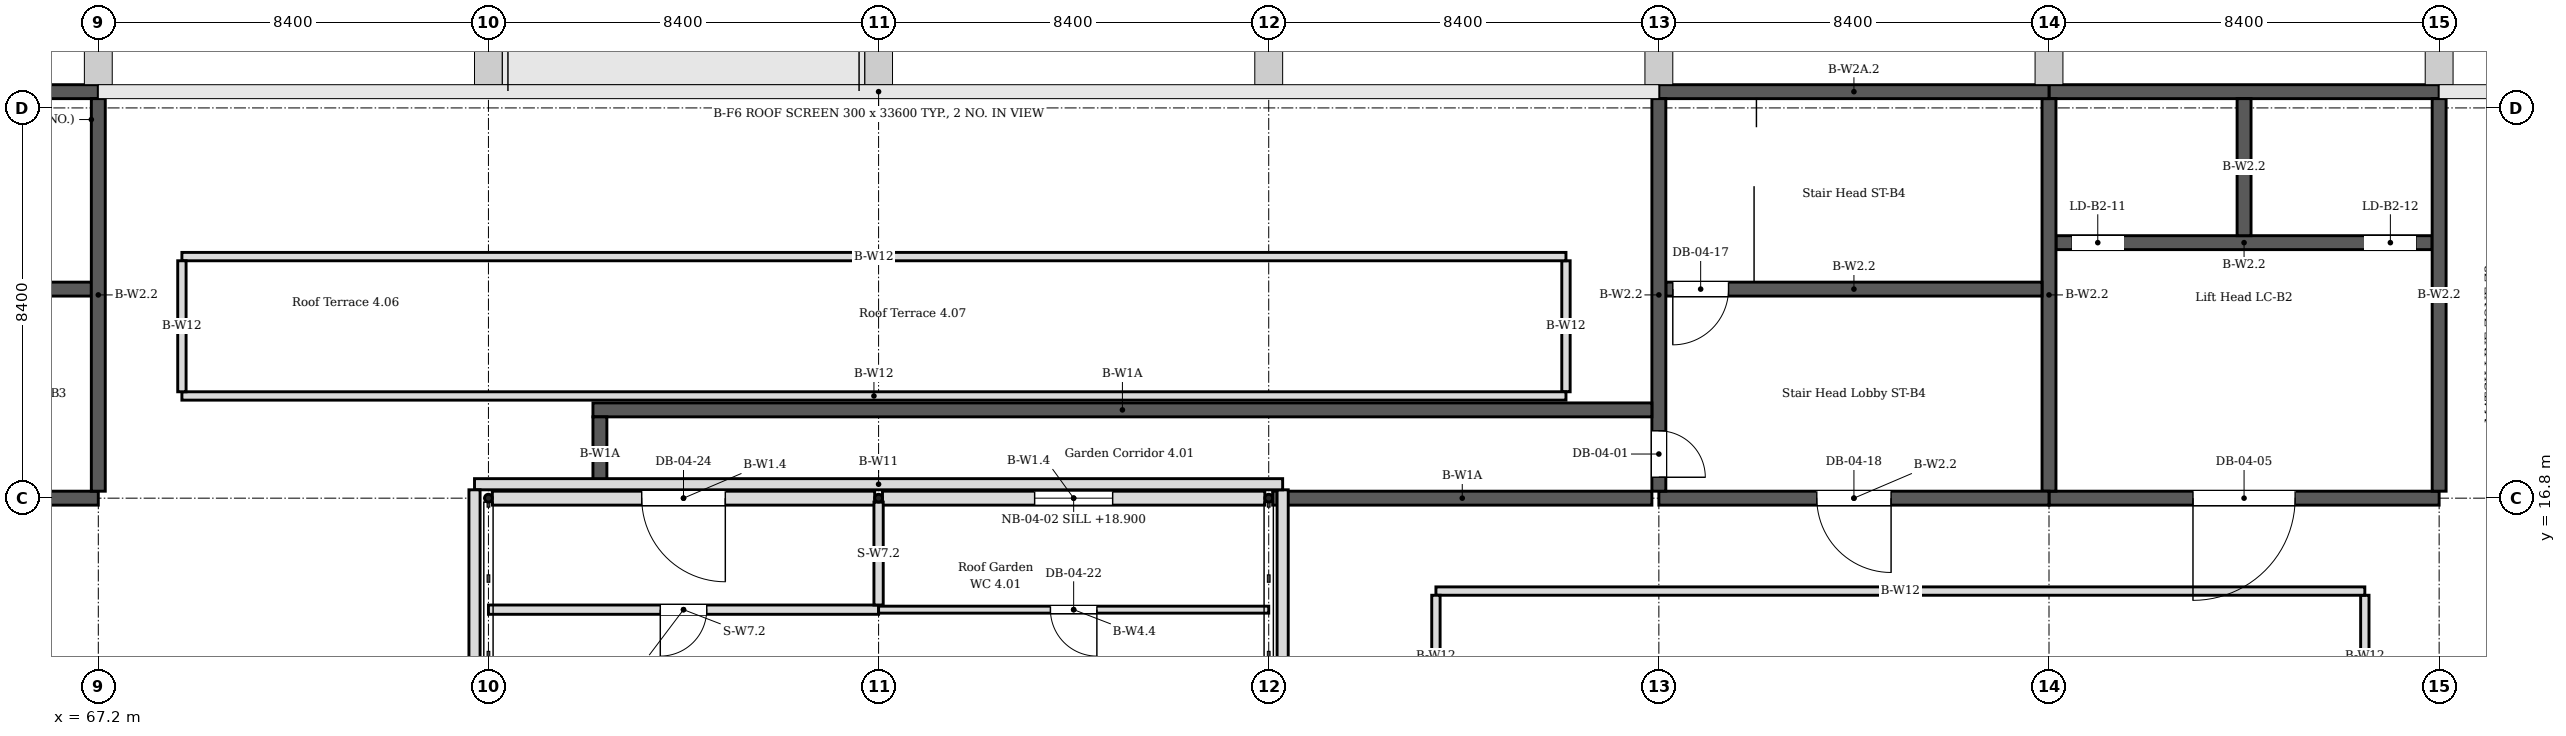
"""IFC4 building model, lengths in metres.
Left out: names, types, materials, properties, quantities, classifications, styles, units other than length and angle.
Written with IfcOpenShell. Run it as: python <this file> out.ifc"""

import sys

from ifc_helpers import new_model, si_unit, direction, frame, frame_2d, origin, origin_2d, place, context, subcontext, project, spatial, rectangle, hollow_circle, extrude, element, fill, save


model = new_model("IFC4")
c1 = context("Model", 3, precision=1e-05, world=origin(), true_north=direction((0.0, 1.0)))
c2 = subcontext(c1, "Body", "Model", "MODEL_VIEW")
j1 = project(units=[si_unit("LENGTHUNIT", "METRE"), si_unit("PLANEANGLEUNIT", "RADIAN")], contexts=[c1])
p1 = place(None, origin())
s1 = spatial("IfcSite", under=j1, at=p1, CompositionType="ELEMENT")
p2 = place(p1, origin())
s2 = spatial("IfcBuilding", under=s1, at=p2, CompositionType="ELEMENT")
p3 = place(p2, frame((0.0, 0.0, 18.6)))
s3 = spatial("IfcBuildingStorey", under=s2, at=p3, CompositionType="ELEMENT", Elevation=18.6)
for number, where, z_axis, x_axis in (
    (1, (109.2, 16.95, 0.0), (0.0, 0.0, 1.0), (0.0, 1.0, 0.0)),
    (2, (117.6, 16.95, 0.0), (0.0, 0.0, 1.0), (0.0, 1.0, 0.0)),
):
    element("IfcWall", number, at=place(p3, frame(where, z_axis=z_axis, x_axis=x_axis)), inside=s3, PredefinedType="SHEAR", context=c2, shape_type="SweptSolid", body=[
        extrude(rectangle(XDim=8.45, YDim=0.3, at=frame_2d((4.225, 0.0))), origin(), (0.0, 0.0, 1.0), 3.89),
    ])
p4 = place(p3, frame((109.2, 16.8, 0.0), z_axis=(0.0, 0.0, 1.0), x_axis=(1.0, 0.0, 0.0)))
e3 = element("IfcWall", 3, at=p4, inside=s3, PredefinedType="SHEAR", context=c2, shape_type="SweptSolid", body=[
    extrude(rectangle(XDim=8.4, YDim=0.3, at=frame_2d((4.2, 0.0))), origin(), (0.0, 0.0, 1.0), 3.89),
])
p5 = place(p4, frame((3.1, 0.0, 0.0)))
e4 = element("IfcOpeningElement", 4, at=p5, cuts=e3, PredefinedType="OPENING", context=c2, shape_type="SweptSolid", body=[
    extrude(rectangle(XDim=2.2, YDim=2.6, at=frame_2d((1.1, 1.3))), frame((0.0, 0.16, 0.0), z_axis=(0.0, -1.0, 0.0), x_axis=(1.0, 0.0, 0.0)), (0.0, 0.0, 1.0), 0.32),
])
p6 = place(p3, frame((109.35, 22.3, 0.0), z_axis=(0.0, 0.0, 1.0), x_axis=(1.0, 0.0, 0.0)))
e5 = element("IfcWall", 5, at=p6, inside=s3, PredefinedType="SHEAR", context=c2, shape_type="SweptSolid", body=[
    extrude(rectangle(XDim=8.1, YDim=0.3, at=frame_2d((4.05, 0.0))), origin(), (0.0, 0.0, 1.0), 3.89),
])
p7 = place(p6, frame((0.35, 0.0, 0.0)))
e6 = element("IfcOpeningElement", 6, at=p7, cuts=e5, PredefinedType="OPENING", context=c2, shape_type="SweptSolid", body=[
    extrude(rectangle(XDim=1.1, YDim=2.2, at=frame_2d((0.55, 1.1))), frame((0.0, 0.16, 0.0), z_axis=(0.0, -1.0, 0.0), x_axis=(1.0, 0.0, 0.0)), (0.0, 0.0, 1.0), 0.32),
])
p8 = place(p6, frame((6.65, 0.0, 0.0)))
e7 = element("IfcOpeningElement", 7, at=p8, cuts=e5, PredefinedType="OPENING", context=c2, shape_type="SweptSolid", body=[
    extrude(rectangle(XDim=1.1, YDim=2.2, at=frame_2d((0.55, 1.1))), frame((0.0, 0.16, 0.0), z_axis=(0.0, -1.0, 0.0), x_axis=(1.0, 0.0, 0.0)), (0.0, 0.0, 1.0), 0.32),
])
p9 = place(p3, frame((109.2, 25.55, 0.0), z_axis=(0.0, 0.0, 1.0), x_axis=(1.0, 0.0, 0.0)))
e8 = element("IfcWall", 8, at=p9, inside=s3, PredefinedType="SHEAR", context=c2, shape_type="SweptSolid", body=[
    extrude(rectangle(XDim=8.4, YDim=0.3, at=frame_2d((4.2, 0.0))), origin(), (0.0, 0.0, 1.0), 3.89),
])
p10 = place(p3, frame((113.4, 22.45, 0.0), z_axis=(0.0, 0.0, 1.0), x_axis=(0.0, 1.0, 0.0)))
e9 = element("IfcWall", 9, at=p10, inside=s3, PredefinedType="SHEAR", context=c2, shape_type="SweptSolid", body=[
    extrude(rectangle(XDim=2.95, YDim=0.3, at=frame_2d((1.475, 0.0))), origin(), (0.0, 0.0, 1.0), 3.89),
])
p11 = place(p3, frame((67.2, 16.95, 0.0), z_axis=(0.0, 0.0, 1.0), x_axis=(0.0, 1.0, 0.0)))
e10 = element("IfcWall", 10, at=p11, inside=s3, PredefinedType="SHEAR", context=c2, shape_type="SweptSolid", body=[
    extrude(rectangle(XDim=8.45, YDim=0.3, at=frame_2d((4.225, 0.0))), origin(), (0.0, 0.0, 1.0), 3.89),
])
p12 = place(p3, frame((58.8, 16.8, 0.0), z_axis=(0.0, 0.0, 1.0), x_axis=(1.0, 0.0, 0.0)))
e11 = element("IfcWall", 11, at=p12, inside=s3, PredefinedType="SHEAR", context=c2, shape_type="SweptSolid", body=[
    extrude(rectangle(XDim=8.4, YDim=0.3, at=frame_2d((4.2, 0.0))), origin(), (0.0, 0.0, 1.0), 3.89),
])
p13 = place(p12, frame((3.4, 0.0, 0.0)))
e12 = element("IfcOpeningElement", 12, at=p13, cuts=e11, PredefinedType="OPENING", context=c2, shape_type="SweptSolid", body=[
    extrude(rectangle(XDim=1.6, YDim=2.4, at=frame_2d((0.8, 1.2))), frame((0.0, 0.16, 0.0), z_axis=(0.0, -1.0, 0.0), x_axis=(1.0, 0.0, 0.0)), (0.0, 0.0, 1.0), 0.32),
])
p14 = place(p3, frame((58.95, 21.3, 0.0), z_axis=(0.0, 0.0, 1.0), x_axis=(1.0, 0.0, 0.0)))
e13 = element("IfcWall", 13, at=p14, inside=s3, PredefinedType="SHEAR", context=c2, shape_type="SweptSolid", body=[
    extrude(rectangle(XDim=8.1, YDim=0.3, at=frame_2d((4.05, 0.0))), origin(), (0.0, 0.0, 1.0), 3.89),
])
p15 = place(p14, frame((0.15, 0.0, 0.0)))
e14 = element("IfcOpeningElement", 14, at=p15, cuts=e13, PredefinedType="OPENING", context=c2, shape_type="SweptSolid", body=[
    extrude(rectangle(XDim=1.2, YDim=2.1, at=frame_2d((0.6, 1.05))), frame((0.0, 0.16, 0.0), z_axis=(0.0, -1.0, 0.0), x_axis=(1.0, 0.0, 0.0)), (0.0, 0.0, 1.0), 0.32),
])
p16 = place(p3, frame((58.8, 25.55, 0.0), z_axis=(0.0, 0.0, 1.0), x_axis=(1.0, 0.0, 0.0)))
e15 = element("IfcWall", 15, at=p16, inside=s3, PredefinedType="SHEAR", context=c2, shape_type="SweptSolid", body=[
    extrude(rectangle(XDim=8.4, YDim=0.3, at=frame_2d((4.2, 0.0))), origin(), (0.0, 0.0, 1.0), 3.89),
])
p17 = place(p3, frame((100.8, 16.95, 0.0), z_axis=(0.0, 0.0, 1.0), x_axis=(0.0, 1.0, 0.0)))
e16 = element("IfcWall", 16, at=p17, inside=s3, PredefinedType="SHEAR", context=c2, shape_type="SweptSolid", body=[
    extrude(rectangle(XDim=8.45, YDim=0.3, at=frame_2d((4.225, 0.0))), origin(), (0.0, 0.0, 1.0), 3.89),
])
p18 = place(p17, frame((0.3, 0.0, 0.0)))
e17 = element("IfcOpeningElement", 17, at=p18, cuts=e16, PredefinedType="OPENING", context=c2, shape_type="SweptSolid", body=[
    extrude(rectangle(XDim=1.0, YDim=2.1, at=frame_2d((0.5, 1.05))), frame((0.0, 0.16, 0.0), z_axis=(0.0, -1.0, 0.0), x_axis=(1.0, 0.0, 0.0)), (0.0, 0.0, 1.0), 0.32),
])
p19 = place(p3, frame((100.8, 16.8, 0.0), z_axis=(0.0, 0.0, 1.0), x_axis=(1.0, 0.0, 0.0)))
e18 = element("IfcWall", 18, at=p19, inside=s3, PredefinedType="SHEAR", context=c2, shape_type="SweptSolid", body=[
    extrude(rectangle(XDim=8.4, YDim=0.3, at=frame_2d((4.2, 0.0))), origin(), (0.0, 0.0, 1.0), 3.89),
])
p20 = place(p19, frame((3.4, 0.0, 0.0)))
e19 = element("IfcOpeningElement", 19, at=p20, cuts=e18, PredefinedType="OPENING", context=c2, shape_type="SweptSolid", body=[
    extrude(rectangle(XDim=1.6, YDim=2.4, at=frame_2d((0.8, 1.2))), frame((0.0, 0.16, 0.0), z_axis=(0.0, -1.0, 0.0), x_axis=(1.0, 0.0, 0.0)), (0.0, 0.0, 1.0), 0.32),
])
p21 = place(p3, frame((100.95, 21.3, 0.0), z_axis=(0.0, 0.0, 1.0), x_axis=(1.0, 0.0, 0.0)))
e20 = element("IfcWall", 20, at=p21, inside=s3, PredefinedType="SHEAR", context=c2, shape_type="SweptSolid", body=[
    extrude(rectangle(XDim=8.1, YDim=0.3, at=frame_2d((4.05, 0.0))), origin(), (0.0, 0.0, 1.0), 3.89),
])
p22 = place(p21, frame((0.15, 0.0, 0.0)))
e21 = element("IfcOpeningElement", 21, at=p22, cuts=e20, PredefinedType="OPENING", context=c2, shape_type="SweptSolid", body=[
    extrude(rectangle(XDim=1.2, YDim=2.1, at=frame_2d((0.6, 1.05))), frame((0.0, 0.16, 0.0), z_axis=(0.0, -1.0, 0.0), x_axis=(1.0, 0.0, 0.0)), (0.0, 0.0, 1.0), 0.32),
])
p23 = place(p3, frame((100.8, 25.55, 0.0), z_axis=(0.0, 0.0, 1.0), x_axis=(1.0, 0.0, 0.0)))
e22 = element("IfcWall", 22, at=p23, inside=s3, PredefinedType="SHEAR", context=c2, shape_type="SweptSolid", body=[
    extrude(rectangle(XDim=8.4, YDim=0.3, at=frame_2d((4.2, 0.0))), origin(), (0.0, 0.0, 1.0), 3.89),
])
for number, where, z_axis, x_axis in (
    (23, (75.6, 16.8, 0.0), (0.0, 0.0, 1.0), (1.0, 0.0, 0.0)),
    (24, (84.0, 16.8, 0.0), (0.0, 0.0, 1.0), (1.0, 0.0, 0.0)),
    (25, (92.4, 16.8, 0.0), (0.0, 0.0, 1.0), (1.0, 0.0, 0.0)),
):
    element("IfcColumn", number, at=place(p3, frame(where, z_axis=z_axis, x_axis=x_axis)), inside=s3, PredefinedType="COLUMN", context=c2, shape_type="SweptSolid", body=[
        extrude(hollow_circle(Radius=0.084, WallThickness=0.008, at=origin_2d()), origin(), (0.0, 0.0, 1.0), 3.6),
    ])
p24 = place(p3, frame((92.484, 16.8, 0.0), z_axis=(0.0, 0.0, 1.0), x_axis=(1.0, 0.0, 0.0)))
e26 = element("IfcWall", 26, at=p24, inside=s3, PredefinedType="SOLIDWALL", context=c2, shape_type="SweptSolid", body=[
    extrude(rectangle(XDim=8.166, YDim=0.3, at=frame_2d((4.083, 0.0))), origin(), (0.0, 0.0, 1.0), 3.0),
])
p25 = place(p3, frame((77.85, 18.7, 0.0), z_axis=(0.0, 0.0, 1.0), x_axis=(1.0, 0.0, 0.0)))
e27 = element("IfcWall", 27, at=p25, inside=s3, PredefinedType="SOLIDWALL", context=c2, shape_type="SweptSolid", body=[
    extrude(rectangle(XDim=22.8, YDim=0.3, at=frame_2d((11.4, 0.0))), origin(), (0.0, 0.0, 1.0), 3.0),
])
p26 = place(p3, frame((78.0, 16.95, 0.0), z_axis=(0.0, 0.0, 1.0), x_axis=(0.0, 1.0, 0.0)))
e28 = element("IfcWall", 28, at=p26, inside=s3, PredefinedType="SOLIDWALL", context=c2, shape_type="SweptSolid", body=[
    extrude(rectangle(XDim=1.6, YDim=0.3, at=frame_2d((0.8, 0.0))), origin(), (0.0, 0.0, 1.0), 3.0),
])
p27 = place(p3, frame((75.6, 14.4, 0.0), z_axis=(0.0, 0.0, 1.0), x_axis=(1.0, 0.0, 0.0)))
e29 = element("IfcWall", 29, at=p27, inside=s3, PredefinedType="PARTITIONING", context=c2, shape_type="SweptSolid", body=[
    extrude(rectangle(XDim=8.4, YDim=0.2, at=frame_2d((4.2, 0.0))), origin(), (0.0, 0.0, 1.0), 3.254),
])
p28 = place(p27, frame((3.7, 0.0, 0.0)))
e30 = element("IfcOpeningElement", 30, at=p28, cuts=e29, PredefinedType="OPENING", context=c2, shape_type="SweptSolid", body=[
    extrude(rectangle(XDim=1.0, YDim=2.1, at=frame_2d((0.5, 1.05))), frame((0.0, 0.11, 0.0), z_axis=(0.0, -1.0, 0.0), x_axis=(1.0, 0.0, 0.0)), (0.0, 0.0, 1.0), 0.22),
])
p29 = place(p3, frame((84.0, 14.4, 0.0), z_axis=(0.0, 0.0, 1.0), x_axis=(1.0, 0.0, 0.0)))
e31 = element("IfcWall", 31, at=p29, inside=s3, PredefinedType="PARTITIONING", context=c2, shape_type="SweptSolid", body=[
    extrude(rectangle(XDim=8.4, YDim=0.15, at=frame_2d((4.2, 0.0))), origin(), (0.0, 0.0, 1.0), 3.254),
])
p30 = place(p29, frame((3.7, 0.0, 0.0)))
e32 = element("IfcOpeningElement", 32, at=p30, cuts=e31, PredefinedType="OPENING", context=c2, shape_type="SweptSolid", body=[
    extrude(rectangle(XDim=1.0, YDim=2.1, at=frame_2d((0.5, 1.05))), frame((0.0, 0.085, 0.0), z_axis=(0.0, -1.0, 0.0), x_axis=(1.0, 0.0, 0.0)), (0.0, 0.0, 1.0), 0.17),
])
p31 = place(p3, frame((84.0, 14.5, 0.0), z_axis=(0.0, 0.0, 1.0), x_axis=(0.0, 1.0, 0.0)))
e33 = element("IfcWall", 33, at=p31, inside=s3, PredefinedType="PARTITIONING", context=c2, shape_type="SweptSolid", body=[
    extrude(rectangle(XDim=2.216, YDim=0.2, at=frame_2d((1.108, 0.0))), origin(), (0.0, 0.0, 1.0), 3.254),
])
p32 = place(p3, frame((75.684, 16.8, 0.0), z_axis=(0.0, 0.0, 1.0), x_axis=(1.0, 0.0, 0.0)))
e34 = element("IfcWall", 34, at=p32, inside=s3, PredefinedType="SOLIDWALL", context=c2, shape_type="SweptSolid", body=[
    extrude(rectangle(XDim=8.232, YDim=0.3, at=frame_2d((4.116, 0.0))), origin(), (0.0, 0.0, 1.0), 3.254),
])
p33 = place(p32, frame((3.216, 0.0, 0.0)))
e35 = element("IfcOpeningElement", 35, at=p33, cuts=e34, PredefinedType="OPENING", context=c2, shape_type="SweptSolid", body=[
    extrude(rectangle(XDim=1.8, YDim=2.2, at=frame_2d((0.9, 1.1))), frame((0.0, 0.16, 0.0), z_axis=(0.0, -1.0, 0.0), x_axis=(1.0, 0.0, 0.0)), (0.0, 0.0, 1.0), 0.32),
])
p34 = place(p3, frame((84.084, 16.8, 0.0), z_axis=(0.0, 0.0, 1.0), x_axis=(1.0, 0.0, 0.0)))
e36 = element("IfcWall", 36, at=p34, inside=s3, PredefinedType="SOLIDWALL", context=c2, shape_type="SweptSolid", body=[
    extrude(rectangle(XDim=8.232, YDim=0.3, at=frame_2d((4.116, 0.0))), origin(), (0.0, 0.0, 1.0), 3.254),
])
p35 = place(p34, frame((3.276, 0.0, 0.3)))
e37 = element("IfcOpeningElement", 37, at=p35, cuts=e36, PredefinedType="OPENING", context=c2, shape_type="SweptSolid", body=[
    extrude(rectangle(XDim=1.68, YDim=2.8, at=frame_2d((0.84, 1.4))), frame((0.0, 0.16, 0.0), z_axis=(0.0, -1.0, 0.0), x_axis=(1.0, 0.0, 0.0)), (0.0, 0.0, 1.0), 0.32),
])
p36 = place(p3, frame((75.3, 17.1, 3.8), z_axis=(0.0, 0.0, 1.0), x_axis=(1.0, 0.0, 0.0)))
e38 = element("IfcWall", 38, at=p36, inside=s3, PredefinedType="SOLIDWALL", context=c2, shape_type="SweptSolid", body=[
    extrude(rectangle(XDim=17.4, YDim=0.24, at=frame_2d((8.7, 0.0))), origin(), (0.0, 0.0, 1.0), 0.5),
])
for number, where, z_axis, x_axis in (
    (39, (75.3, 8.22, 3.8), (0.0, 0.0, 1.0), (0.0, 1.0, 0.0)),
    (40, (92.7, 8.22, 3.8), (0.0, 0.0, 1.0), (0.0, 1.0, 0.0)),
):
    element("IfcWall", number, at=place(p3, frame(where, z_axis=z_axis, x_axis=x_axis)), inside=s3, PredefinedType="SOLIDWALL", context=c2, shape_type="SweptSolid", body=[
        extrude(rectangle(XDim=8.76, YDim=0.24, at=frame_2d((4.38, 0.0))), origin(), (0.0, 0.0, 1.0), 0.5),
    ])
p37 = place(p3, frame((96.0, 14.8, 0.0), z_axis=(0.0, 0.0, 1.0), x_axis=(1.0, 0.0, 0.0)))
e41 = element("IfcWall", 41, at=p37, inside=s3, PredefinedType="SOLIDWALL", context=c2, shape_type="SweptSolid", body=[
    extrude(rectangle(XDim=20.0, YDim=0.18, at=frame_2d((10.0, 0.0))), origin(), (0.0, 0.0, 1.0), 0.7),
])
for number, where, z_axis, x_axis in (
    (42, (96.0, 12.09, 0.0), (0.0, 0.0, 1.0), (0.0, 1.0, 0.0)),
    (43, (116.0, 12.09, 0.0), (0.0, 0.0, 1.0), (0.0, 1.0, 0.0)),
):
    element("IfcWall", number, at=place(p3, frame(where, z_axis=z_axis, x_axis=x_axis)), inside=s3, PredefinedType="SOLIDWALL", context=c2, shape_type="SweptSolid", body=[
        extrude(rectangle(XDim=2.62, YDim=0.18, at=frame_2d((1.31, 0.0))), origin(), (0.0, 0.0, 1.0), 0.7),
    ])
for number, where, z_axis, x_axis in (
    (44, (69.0, 19.0, 0.0), (0.0, 0.0, 1.0), (1.0, 0.0, 0.0)),
    (45, (69.0, 22.0, 0.0), (0.0, 0.0, 1.0), (1.0, 0.0, 0.0)),
):
    element("IfcWall", number, at=place(p3, frame(where, z_axis=z_axis, x_axis=x_axis)), inside=s3, PredefinedType="SOLIDWALL", context=c2, shape_type="SweptSolid", body=[
        extrude(rectangle(XDim=29.8, YDim=0.18, at=frame_2d((14.9, 0.0))), origin(), (0.0, 0.0, 1.0), 0.7),
    ])
for number, where, z_axis, x_axis in (
    (46, (69.0, 19.09, 0.0), (0.0, 0.0, 1.0), (0.0, 1.0, 0.0)),
    (47, (98.8, 19.09, 0.0), (0.0, 0.0, 1.0), (0.0, 1.0, 0.0)),
):
    element("IfcWall", number, at=place(p3, frame(where, z_axis=z_axis, x_axis=x_axis)), inside=s3, PredefinedType="SOLIDWALL", context=c2, shape_type="SweptSolid", body=[
        extrude(rectangle(XDim=2.82, YDim=0.18, at=frame_2d((1.41, 0.0))), origin(), (0.0, 0.0, 1.0), 0.7),
    ])
p38 = place(p18, origin())
e48 = element("IfcDoor", 48, at=p38, inside=s3, OperationType="SINGLE_SWING_LEFT", PredefinedType="DOOR", context=c2, shape_type="SweptSolid", body=[
    extrude(rectangle(XDim=1.0, YDim=2.1, at=frame_2d((0.5, 1.05))), frame((0.0, 0.025, 0.0), z_axis=(0.0, -1.0, 0.0), x_axis=(1.0, 0.0, 0.0)), (0.0, 0.0, 1.0), 0.05),
])
fill(e17, e48)
p39 = place(p5, origin())
e49 = element("IfcDoor", 49, at=p39, inside=s3, OperationType="DOUBLE_DOOR_SINGLE_SWING", PredefinedType="DOOR", context=c2, shape_type="SweptSolid", body=[
    extrude(rectangle(XDim=2.2, YDim=2.6, at=frame_2d((1.1, 1.3))), frame((0.0, 0.025, 0.0), z_axis=(0.0, -1.0, 0.0), x_axis=(1.0, 0.0, 0.0)), (0.0, 0.0, 1.0), 0.05),
])
fill(e4, e49)
p40 = place(p7, origin())
e50 = element("IfcDoor", 50, at=p40, inside=s3, OperationType="SLIDING_TO_LEFT", PredefinedType="DOOR", context=c2, shape_type="SweptSolid", body=[
    extrude(rectangle(XDim=1.1, YDim=2.2, at=frame_2d((0.55, 1.1))), frame((0.0, 0.025, 0.0), z_axis=(0.0, -1.0, 0.0), x_axis=(1.0, 0.0, 0.0)), (0.0, 0.0, 1.0), 0.05),
])
fill(e6, e50)
p41 = place(p8, origin())
e51 = element("IfcDoor", 51, at=p41, inside=s3, OperationType="SLIDING_TO_LEFT", PredefinedType="DOOR", context=c2, shape_type="SweptSolid", body=[
    extrude(rectangle(XDim=1.1, YDim=2.2, at=frame_2d((0.55, 1.1))), frame((0.0, 0.025, 0.0), z_axis=(0.0, -1.0, 0.0), x_axis=(1.0, 0.0, 0.0)), (0.0, 0.0, 1.0), 0.05),
])
fill(e7, e51)
p42 = place(p22, origin())
e52 = element("IfcDoor", 52, at=p42, inside=s3, OperationType="SINGLE_SWING_LEFT", PredefinedType="DOOR", context=c2, shape_type="SweptSolid", body=[
    extrude(rectangle(XDim=1.2, YDim=2.1, at=frame_2d((0.6, 1.05))), frame((0.0, 0.025, 0.0), z_axis=(0.0, -1.0, 0.0), x_axis=(1.0, 0.0, 0.0)), (0.0, 0.0, 1.0), 0.05),
])
fill(e21, e52)
p43 = place(p20, origin())
e53 = element("IfcDoor", 53, at=p43, inside=s3, OperationType="DOUBLE_DOOR_SINGLE_SWING", PredefinedType="DOOR", context=c2, shape_type="SweptSolid", body=[
    extrude(rectangle(XDim=1.6, YDim=2.4, at=frame_2d((0.8, 1.2))), frame((0.0, 0.025, 0.0), z_axis=(0.0, -1.0, 0.0), x_axis=(1.0, 0.0, 0.0)), (0.0, 0.0, 1.0), 0.05),
])
fill(e19, e53)
p44 = place(p28, origin())
e54 = element("IfcDoor", 54, at=p44, inside=s3, OperationType="SINGLE_SWING_LEFT", PredefinedType="DOOR", context=c2, shape_type="SweptSolid", body=[
    extrude(rectangle(XDim=1.0, YDim=2.1, at=frame_2d((0.5, 1.05))), frame((0.0, 0.025, 0.0), z_axis=(0.0, -1.0, 0.0), x_axis=(1.0, 0.0, 0.0)), (0.0, 0.0, 1.0), 0.05),
])
fill(e30, e54)
p45 = place(p30, origin())
e55 = element("IfcDoor", 55, at=p45, inside=s3, OperationType="SINGLE_SWING_LEFT", PredefinedType="DOOR", context=c2, shape_type="SweptSolid", body=[
    extrude(rectangle(XDim=1.0, YDim=2.1, at=frame_2d((0.5, 1.05))), frame((0.0, 0.025, 0.0), z_axis=(0.0, -1.0, 0.0), x_axis=(1.0, 0.0, 0.0)), (0.0, 0.0, 1.0), 0.05),
])
fill(e32, e55)
p46 = place(p33, origin())
e56 = element("IfcDoor", 56, at=p46, inside=s3, OperationType="DOUBLE_DOOR_SINGLE_SWING", PredefinedType="DOOR", context=c2, shape_type="SweptSolid", body=[
    extrude(rectangle(XDim=1.8, YDim=2.2, at=frame_2d((0.9, 1.1))), frame((0.0, 0.025, 0.0), z_axis=(0.0, -1.0, 0.0), x_axis=(1.0, 0.0, 0.0)), (0.0, 0.0, 1.0), 0.05),
])
fill(e35, e56)
p47 = place(p35, origin())
e57 = element("IfcWindow", 57, at=p47, inside=s3, PartitioningType="DOUBLE_PANEL_VERTICAL", PredefinedType="WINDOW", context=c2, shape_type="SweptSolid", body=[
    extrude(rectangle(XDim=1.68, YDim=2.8, at=frame_2d((0.84, 1.4))), frame((0.0, 0.03, 0.0), z_axis=(0.0, -1.0, 0.0), x_axis=(1.0, 0.0, 0.0)), (0.0, 0.0, 1.0), 0.06),
])
fill(e37, e57)
save(model, sys.argv[1])
